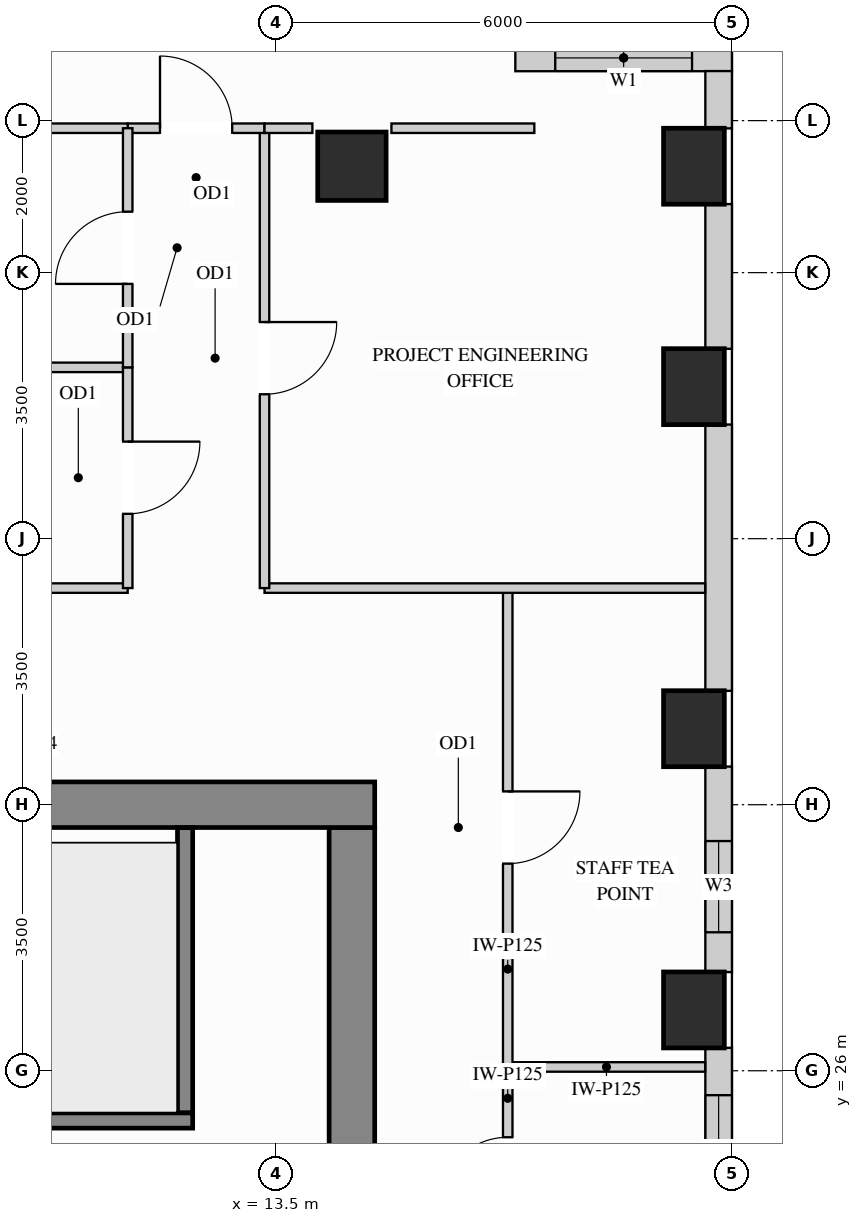
"""IFC4 building model, lengths in metres.
Left out: names, types, materials, properties, quantities, classifications, styles, units other than length and angle.
Written with IfcOpenShell. Run it as: python <this file> out.ifc"""

import sys

from ifc_helpers import new_model, si_unit, direction, frame, frame_2d, origin, origin_2d, place, context, subcontext, project, spatial, rectangle, extrude, source, transform, mapped, element, fill, save


model = new_model("IFC4")
c1 = context("Model", 3, precision=1e-05, world=origin(), true_north=direction((0.0, 1.0)))
c2 = subcontext(c1, "Body", "Model", "MODEL_VIEW")
j1 = project(units=[si_unit("LENGTHUNIT", "METRE"), si_unit("PLANEANGLEUNIT", "RADIAN")], contexts=[c1])
p1 = place(None, origin())
s1 = spatial("IfcSite", under=j1, at=p1, CompositionType="ELEMENT")
p2 = place(p1, origin())
s2 = spatial("IfcBuilding", under=s1, at=p2, CompositionType="ELEMENT")
p3 = place(p2, frame((0.0, 0.0, 197.1)))
s3 = spatial("IfcBuildingStorey", under=s2, at=p3, CompositionType="ELEMENT", Elevation=197.1)
m1 = source(origin(), c2, "Body", "SweptSolid", [
    extrude(rectangle(XDim=0.9, YDim=0.9, at=origin_2d()), origin(), (0.0, 0.0, 1.0), 3.4),
])
p4 = place(p3, frame((14.5, 37.9, 0.0), z_axis=(0.0, 0.0, 1.0), x_axis=(1.0, 0.0, 0.0)))
e1 = element("IfcColumn", 1, at=p4, inside=s3, PredefinedType="COLUMN", context=c2, shape_type="MappedRepresentation", body=[
    mapped(m1, transform((0.0, 0.0, 0.0), x_axis=(1.0, 0.0, 0.0), y_axis=(0.0, 1.0, 0.0), z_axis=(0.0, 0.0, 1.0))),
])
m2 = source(origin(), c2, "Body", "SweptSolid", [
    extrude(rectangle(XDim=0.8, YDim=1.0, at=origin_2d()), origin(), (0.0, 0.0, 1.0), 3.4),
])
for number, where, z_axis, x_axis in (
    (2, (19.0, 26.8, 0.0), (0.0, 0.0, 1.0), (1.0, 0.0, 0.0)),
    (3, (19.0, 30.5, 0.0), (0.0, 0.0, 1.0), (1.0, 0.0, 0.0)),
    (4, (19.0, 35.0, 0.0), (0.0, 0.0, 1.0), (1.0, 0.0, 0.0)),
    (5, (19.0, 37.9, 0.0), (0.0, 0.0, 1.0), (1.0, 0.0, 0.0)),
):
    element("IfcColumn", number, at=place(p3, frame(where, z_axis=z_axis, x_axis=x_axis)), inside=s3, PredefinedType="COLUMN", context=c2, shape_type="MappedRepresentation", body=[
        mapped(m2, transform((0.0, 0.0, 0.0), x_axis=(1.0, 0.0, 0.0), y_axis=(0.0, 1.0, 0.0), z_axis=(0.0, 0.0, 1.0))),
    ])
m3 = source(origin(), c2, "Body", "SweptSolid", [
    extrude(rectangle(XDim=8.32, YDim=0.6, at=frame_2d((4.16, 0.0))), origin(), (0.0, 0.0, 1.0), 3.4),
])
p5 = place(p3, frame((14.5, 20.88, 0.0), z_axis=(0.0, 0.0, 1.0), x_axis=(0.0, 1.0, 0.0)))
e6 = element("IfcWall", 6, at=p5, inside=s3, PredefinedType="SHEAR", context=c2, shape_type="MappedRepresentation", body=[
    mapped(m3, transform((0.0, 0.0, 0.0), x_axis=(1.0, 0.0, 0.0), y_axis=(0.0, 1.0, 0.0), z_axis=(0.0, 0.0, 1.0))),
])
m4 = source(origin(), c2, "Body", "SweptSolid", [
    extrude(rectangle(XDim=10.6, YDim=0.6, at=frame_2d((5.3, 0.0))), origin(), (0.0, 0.0, 1.0), 3.4),
])
p6 = place(p3, frame((4.2, 29.5, 0.0), z_axis=(0.0, 0.0, 1.0), x_axis=(1.0, 0.0, 0.0)))
e7 = element("IfcWall", 7, at=p6, inside=s3, PredefinedType="SHEAR", context=c2, shape_type="MappedRepresentation", body=[
    mapped(m4, transform((0.0, 0.0, 0.0), x_axis=(1.0, 0.0, 0.0), y_axis=(0.0, 1.0, 0.0), z_axis=(0.0, 0.0, 1.0))),
])
p7 = place(p3, frame((19.5, 39.325, 0.0), z_axis=(0.0, 0.0, 1.0), x_axis=(-1.0, 0.0, 0.0)))
e8 = element("IfcWall", 8, at=p7, inside=s3, PredefinedType="SOLIDWALL", context=c2, shape_type="SweptSolid", body=[
    extrude(rectangle(XDim=2.85, YDim=0.35, at=frame_2d((1.425, 0.0))), origin(), (0.0, 0.0, 1.0), 3.385),
])
p8 = place(p7, frame((0.525, 0.0, 0.78)))
e9 = element("IfcOpeningElement", 9, at=p8, cuts=e8, PredefinedType="OPENING", context=c2, shape_type="SweptSolid", body=[
    extrude(rectangle(XDim=1.8, YDim=2.1, at=frame_2d((0.9, 1.05))), frame((0.0, 0.185, 0.0), z_axis=(0.0, -1.0, 0.0), x_axis=(1.0, 0.0, 0.0)), (0.0, 0.0, 1.0), 0.37),
])
p9 = place(p3, frame((19.325, 22.998, 0.0), z_axis=(0.0, 0.0, 1.0), x_axis=(0.0, 1.0, 0.0)))
e10 = element("IfcWall", 10, at=p9, inside=s3, PredefinedType="SOLIDWALL", context=c2, shape_type="SweptSolid", body=[
    extrude(rectangle(XDim=3.304, YDim=0.35, at=frame_2d((1.652, 0.0))), origin(), (0.0, 0.0, 1.0), 2.612),
])
p10 = place(p9, frame((1.18, 0.0, 0.78)))
e11 = element("IfcOpeningElement", 11, at=p10, cuts=e10, PredefinedType="OPENING", context=c2, shape_type="SweptSolid", body=[
    extrude(rectangle(XDim=1.5, YDim=1.652, at=frame_2d((0.75, 0.826))), frame((0.0, 0.185, 0.0), z_axis=(0.0, -1.0, 0.0), x_axis=(1.0, 0.0, 0.0)), (0.0, 0.0, 1.0), 0.37),
])
p11 = place(p3, frame((19.325, 27.298, 0.0), z_axis=(0.0, 0.0, 1.0), x_axis=(0.0, 1.0, 0.0)))
e12 = element("IfcWall", 12, at=p11, inside=s3, PredefinedType="SOLIDWALL", context=c2, shape_type="SweptSolid", body=[
    extrude(rectangle(XDim=2.704, YDim=0.35, at=frame_2d((1.352, 0.0))), origin(), (0.0, 0.0, 1.0), 2.612),
])
p12 = place(p11, frame((0.524, 0.0, 0.78)))
e13 = element("IfcOpeningElement", 13, at=p12, cuts=e12, PredefinedType="OPENING", context=c2, shape_type="SweptSolid", body=[
    extrude(rectangle(XDim=1.2, YDim=1.652, at=frame_2d((0.6, 0.826))), frame((0.0, 0.185, 0.0), z_axis=(0.0, -1.0, 0.0), x_axis=(1.0, 0.0, 0.0)), (0.0, 0.0, 1.0), 0.37),
])
m5 = source(origin(), c2, "Body", "SweptSolid", [
    extrude(rectangle(XDim=3.504, YDim=0.35, at=frame_2d((1.752, 0.0))), origin(), (0.0, 0.0, 1.0), 2.612),
])
p13 = place(p3, frame((19.325, 30.998, 0.0), z_axis=(0.0, 0.0, 1.0), x_axis=(0.0, 1.0, 0.0)))
e14 = element("IfcWall", 14, at=p13, inside=s3, PredefinedType="SOLIDWALL", context=c2, shape_type="MappedRepresentation", body=[
    mapped(m5, transform((0.0, 0.0, 0.0), x_axis=(1.0, 0.0, 0.0), y_axis=(0.0, 1.0, 0.0), z_axis=(0.0, 0.0, 1.0))),
])
m6 = source(origin(), c2, "Body", "SweptSolid", [
    extrude(rectangle(XDim=1.904, YDim=0.35, at=frame_2d((0.952, 0.0))), origin(), (0.0, 0.0, 1.0), 2.612),
])
p14 = place(p3, frame((19.325, 35.498, 0.0), z_axis=(0.0, 0.0, 1.0), x_axis=(0.0, 1.0, 0.0)))
e15 = element("IfcWall", 15, at=p14, inside=s3, PredefinedType="SOLIDWALL", context=c2, shape_type="MappedRepresentation", body=[
    mapped(m6, transform((0.0, 0.0, 0.0), x_axis=(1.0, 0.0, 0.0), y_axis=(0.0, 1.0, 0.0), z_axis=(0.0, 0.0, 1.0))),
])
m7 = source(origin(), c2, "Body", "SweptSolid", [
    extrude(rectangle(XDim=0.754, YDim=0.35, at=frame_2d((0.377, 0.0))), origin(), (0.0, 0.0, 1.0), 3.385),
])
p15 = place(p3, frame((19.325, 38.398, 0.0), z_axis=(0.0, 0.0, 1.0), x_axis=(0.0, 1.0, 0.0)))
e16 = element("IfcWall", 16, at=p15, inside=s3, PredefinedType="SOLIDWALL", context=c2, shape_type="MappedRepresentation", body=[
    mapped(m7, transform((0.0, 0.0, 0.0), x_axis=(1.0, 0.0, 0.0), y_axis=(0.0, 1.0, 0.0), z_axis=(0.0, 0.0, 1.0))),
])
m8 = source(origin(), c2, "Body", "SweptSolid", [
    extrude(rectangle(XDim=2.598, YDim=0.125, at=frame_2d((1.299, 0.0))), origin(), (0.0, 0.0, 1.0), 3.385),
])
p16 = place(p3, frame((16.55, 26.05, 0.0), z_axis=(0.0, 0.0, 1.0), x_axis=(1.0, 0.0, 0.0)))
e17 = element("IfcWall", 17, at=p16, inside=s3, PredefinedType="PARTITIONING", context=c2, shape_type="MappedRepresentation", body=[
    mapped(m8, transform((0.0, 0.0, 0.0), x_axis=(1.0, 0.0, 0.0), y_axis=(0.0, 1.0, 0.0), z_axis=(0.0, 0.0, 1.0))),
])
p17 = place(p3, frame((16.55, 26.05, 0.0), z_axis=(0.0, 0.0, 1.0), x_axis=(0.0, 1.0, 0.0)))
e18 = element("IfcWall", 18, at=p17, inside=s3, PredefinedType="PARTITIONING", context=c2, shape_type="SweptSolid", body=[
    extrude(rectangle(XDim=6.3, YDim=0.125, at=frame_2d((3.15, 0.0))), origin(), (0.0, 0.0, 1.0), 3.385),
])
p18 = place(p17, frame((2.675, 0.0, 0.0)))
e19 = element("IfcOpeningElement", 19, at=p18, cuts=e18, PredefinedType="OPENING", context=c2, shape_type="SweptSolid", body=[
    extrude(rectangle(XDim=0.95, YDim=2.15, at=frame_2d((0.475, 1.075))), frame((0.0, 0.073, 0.0), z_axis=(0.0, -1.0, 0.0), x_axis=(1.0, 0.0, 0.0)), (0.0, 0.0, 1.0), 0.145),
])
p19 = place(p3, frame((16.55, 23.35, 0.0), z_axis=(0.0, 0.0, 1.0), x_axis=(0.0, 1.0, 0.0)))
e20 = element("IfcWall", 20, at=p19, inside=s3, PredefinedType="PARTITIONING", context=c2, shape_type="SweptSolid", body=[
    extrude(rectangle(XDim=2.7, YDim=0.125, at=frame_2d((1.35, 0.0))), origin(), (0.0, 0.0, 1.0), 3.385),
])
p20 = place(p19, frame((0.875, 0.0, 0.0)))
e21 = element("IfcOpeningElement", 21, at=p20, cuts=e20, PredefinedType="OPENING", context=c2, shape_type="SweptSolid", body=[
    extrude(rectangle(XDim=0.9, YDim=2.15, at=frame_2d((0.45, 1.075))), frame((0.0, 0.073, 0.0), z_axis=(0.0, -1.0, 0.0), x_axis=(1.0, 0.0, 0.0)), (0.0, 0.0, 1.0), 0.145),
])
m9 = source(origin(), c2, "Body", "SweptSolid", [
    extrude(rectangle(XDim=5.798, YDim=0.125, at=frame_2d((2.899, 0.0))), origin(), (0.0, 0.0, 1.0), 3.385),
])
p21 = place(p3, frame((13.35, 32.35, 0.0), z_axis=(0.0, 0.0, 1.0), x_axis=(1.0, 0.0, 0.0)))
e22 = element("IfcWall", 22, at=p21, inside=s3, PredefinedType="PARTITIONING", context=c2, shape_type="MappedRepresentation", body=[
    mapped(m9, transform((0.0, 0.0, 0.0), x_axis=(1.0, 0.0, 0.0), y_axis=(0.0, 1.0, 0.0), z_axis=(0.0, 0.0, 1.0))),
])
m10 = source(origin(), c2, "Body", "SweptSolid", [
    extrude(rectangle(XDim=11.198, YDim=0.125, at=frame_2d((5.599, 0.0))), origin(), (0.0, 0.0, 1.0), 3.385),
])
p22 = place(p3, frame((0.352, 32.35, 0.0), z_axis=(0.0, 0.0, 1.0), x_axis=(1.0, 0.0, 0.0)))
e23 = element("IfcWall", 23, at=p22, inside=s3, PredefinedType="PARTITIONING", context=c2, shape_type="MappedRepresentation", body=[
    mapped(m10, transform((0.0, 0.0, 0.0), x_axis=(1.0, 0.0, 0.0), y_axis=(0.0, 1.0, 0.0), z_axis=(0.0, 0.0, 1.0))),
])
m11 = source(origin(), c2, "Body", "SweptSolid", [
    extrude(rectangle(XDim=10.43, YDim=0.125, at=frame_2d((5.215, 0.0))), origin(), (0.0, 0.0, 1.0), 2.448),
])
p23 = place(p3, frame((1.12, 35.254, 0.0), z_axis=(0.0, 0.0, 1.0), x_axis=(1.0, 0.0, 0.0)))
e24 = element("IfcWall", 24, at=p23, inside=s3, PredefinedType="PARTITIONING", context=c2, shape_type="MappedRepresentation", body=[
    mapped(m11, transform((0.0, 0.0, 0.0), x_axis=(1.0, 0.0, 0.0), y_axis=(0.0, 1.0, 0.0), z_axis=(0.0, 0.0, 1.0))),
])
p24 = place(p3, frame((13.35, 32.35, 0.0), z_axis=(0.0, 0.0, 1.0), x_axis=(0.0, 1.0, 0.0)))
e25 = element("IfcWall", 25, at=p24, inside=s3, PredefinedType="PARTITIONING", context=c2, shape_type="SweptSolid", body=[
    extrude(rectangle(XDim=6.05, YDim=0.125, at=frame_2d((3.025, 0.0))), origin(), (0.0, 0.0, 1.0), 3.385),
])
p25 = place(p24, frame((2.55, 0.0, 0.0)))
e26 = element("IfcOpeningElement", 26, at=p25, cuts=e25, PredefinedType="OPENING", context=c2, shape_type="SweptSolid", body=[
    extrude(rectangle(XDim=0.95, YDim=2.15, at=frame_2d((0.475, 1.075))), frame((0.0, 0.073, 0.0), z_axis=(0.0, -1.0, 0.0), x_axis=(1.0, 0.0, 0.0)), (0.0, 0.0, 1.0), 0.145),
])
p26 = place(p3, frame((11.55, 38.4, 0.0), z_axis=(0.0, 0.0, 1.0), x_axis=(1.0, 0.0, 0.0)))
e27 = element("IfcWall", 27, at=p26, inside=s3, PredefinedType="PARTITIONING", context=c2, shape_type="SweptSolid", body=[
    extrude(rectangle(XDim=1.8, YDim=0.125, at=frame_2d((0.9, 0.0))), origin(), (0.0, 0.0, 1.0), 3.385),
])
p27 = place(p26, frame((0.425, 0.0, 0.0)))
e28 = element("IfcOpeningElement", 28, at=p27, cuts=e27, PredefinedType="OPENING", context=c2, shape_type="SweptSolid", body=[
    extrude(rectangle(XDim=0.95, YDim=2.15, at=frame_2d((0.475, 1.075))), frame((0.0, 0.073, 0.0), z_axis=(0.0, -1.0, 0.0), x_axis=(1.0, 0.0, 0.0)), (0.0, 0.0, 1.0), 0.145),
])
m12 = source(origin(), c2, "Body", "SweptSolid", [
    extrude(rectangle(XDim=0.63, YDim=0.125, at=frame_2d((0.315, 0.0))), origin(), (0.0, 0.0, 1.0), 3.385),
])
p28 = place(p3, frame((13.35, 38.4, 0.0), z_axis=(0.0, 0.0, 1.0), x_axis=(1.0, 0.0, 0.0)))
e29 = element("IfcWall", 29, at=p28, inside=s3, PredefinedType="PARTITIONING", context=c2, shape_type="MappedRepresentation", body=[
    mapped(m12, transform((0.0, 0.0, 0.0), x_axis=(1.0, 0.0, 0.0), y_axis=(0.0, 1.0, 0.0), z_axis=(0.0, 0.0, 1.0))),
])
m13 = source(origin(), c2, "Body", "SweptSolid", [
    extrude(rectangle(XDim=1.88, YDim=0.125, at=frame_2d((0.94, 0.0))), origin(), (0.0, 0.0, 1.0), 3.385),
])
p29 = place(p3, frame((15.02, 38.4, 0.0), z_axis=(0.0, 0.0, 1.0), x_axis=(1.0, 0.0, 0.0)))
e30 = element("IfcWall", 30, at=p29, inside=s3, PredefinedType="PARTITIONING", context=c2, shape_type="MappedRepresentation", body=[
    mapped(m13, transform((0.0, 0.0, 0.0), x_axis=(1.0, 0.0, 0.0), y_axis=(0.0, 1.0, 0.0), z_axis=(0.0, 0.0, 1.0))),
])
m14 = source(origin(), c2, "Body", "SweptSolid", [
    extrude(rectangle(XDim=2.03, YDim=0.125, at=frame_2d((1.015, 0.0))), origin(), (0.0, 0.0, 1.0), 3.385),
])
p30 = place(p3, frame((9.52, 38.4, 0.0), z_axis=(0.0, 0.0, 1.0), x_axis=(1.0, 0.0, 0.0)))
e31 = element("IfcWall", 31, at=p30, inside=s3, PredefinedType="PARTITIONING", context=c2, shape_type="MappedRepresentation", body=[
    mapped(m14, transform((0.0, 0.0, 0.0), x_axis=(1.0, 0.0, 0.0), y_axis=(0.0, 1.0, 0.0), z_axis=(0.0, 0.0, 1.0))),
])
p31 = place(p3, frame((11.55, 32.35, 0.0), z_axis=(0.0, 0.0, 1.0), x_axis=(0.0, 1.0, 0.0)))
e32 = element("IfcWall", 32, at=p31, inside=s3, PredefinedType="PARTITIONING", context=c2, shape_type="SweptSolid", body=[
    extrude(rectangle(XDim=2.904, YDim=0.125, at=frame_2d((1.452, 0.0))), origin(), (0.0, 0.0, 1.0), 3.385),
])
p32 = place(p31, frame((0.977, 0.0, 0.0)))
e33 = element("IfcOpeningElement", 33, at=p32, cuts=e32, PredefinedType="OPENING", context=c2, shape_type="SweptSolid", body=[
    extrude(rectangle(XDim=0.95, YDim=2.15, at=frame_2d((0.475, 1.075))), frame((0.0, 0.073, 0.0), z_axis=(0.0, -1.0, 0.0), x_axis=(1.0, 0.0, 0.0)), (0.0, 0.0, 1.0), 0.145),
])
p33 = place(p3, frame((11.55, 35.254, 0.0), z_axis=(0.0, 0.0, 1.0), x_axis=(0.0, 1.0, 0.0)))
e34 = element("IfcWall", 34, at=p33, inside=s3, PredefinedType="PARTITIONING", context=c2, shape_type="SweptSolid", body=[
    extrude(rectangle(XDim=3.146, YDim=0.125, at=frame_2d((1.573, 0.0))), origin(), (0.0, 0.0, 1.0), 3.385),
])
p34 = place(p33, frame((1.098, 0.0, 0.0)))
e35 = element("IfcOpeningElement", 35, at=p34, cuts=e34, PredefinedType="OPENING", context=c2, shape_type="SweptSolid", body=[
    extrude(rectangle(XDim=0.95, YDim=2.15, at=frame_2d((0.475, 1.075))), frame((0.0, 0.073, 0.0), z_axis=(0.0, -1.0, 0.0), x_axis=(1.0, 0.0, 0.0)), (0.0, 0.0, 1.0), 0.145),
])
m15 = source(origin(), c2, "Body", "SweptSolid", [
    extrude(rectangle(XDim=3.753, YDim=0.2, at=frame_2d((1.876, 0.0))), origin(), (0.0, 0.0, 1.0), 3.4),
])
p35 = place(p3, frame((12.305, 25.445, 0.0), z_axis=(0.0, 0.0, 1.0), x_axis=(0.0, 1.0, 0.0)))
e36 = element("IfcWall", 36, at=p35, inside=s3, PredefinedType="SHEAR", context=c2, shape_type="MappedRepresentation", body=[
    mapped(m15, transform((0.0, 0.0, 0.0), x_axis=(1.0, 0.0, 0.0), y_axis=(0.0, 1.0, 0.0), z_axis=(0.0, 0.0, 1.0))),
])
p36 = place(p3, frame((4.802, 25.345, 0.0), z_axis=(0.0, 0.0, 1.0), x_axis=(1.0, 0.0, 0.0)))
e37 = element("IfcWall", 37, at=p36, inside=s3, PredefinedType="SHEAR", context=c2, shape_type="SweptSolid", body=[
    extrude(rectangle(XDim=7.603, YDim=0.2, at=frame_2d((3.802, 0.0))), origin(), (0.0, 0.0, 1.0), 3.4),
])
p37 = place(p36, frame((0.4, 0.0, 0.0)))
e38 = element("IfcOpeningElement", 38, at=p37, cuts=e37, PredefinedType="OPENING", context=c2, shape_type="SweptSolid", body=[
    extrude(rectangle(XDim=1.1, YDim=2.15, at=frame_2d((0.55, 1.075))), frame((0.0, 0.11, 0.0), z_axis=(0.0, -1.0, 0.0), x_axis=(1.0, 0.0, 0.0)), (0.0, 0.0, 1.0), 0.22),
])
m16 = source(origin(), c2, "Body", "SweptSolid", [
    extrude(rectangle(XDim=0.95, YDim=2.15, at=frame_2d((0.475, 1.075))), frame((0.0, 0.025, 0.0), z_axis=(0.0, -1.0, 0.0), x_axis=(1.0, 0.0, 0.0)), (0.0, 0.0, 1.0), 0.05),
])
p38 = place(p18, origin())
e39 = element("IfcDoor", 39, at=p38, inside=s3, OperationType="SINGLE_SWING_RIGHT", PredefinedType="DOOR", context=c2, shape_type="MappedRepresentation", body=[
    mapped(m16, transform((0.0, 0.0, 0.0), x_axis=(1.0, 0.0, 0.0), y_axis=(0.0, 1.0, 0.0), z_axis=(0.0, 0.0, 1.0))),
])
fill(e19, e39)
p39 = place(p25, origin())
e40 = element("IfcDoor", 40, at=p39, inside=s3, OperationType="SINGLE_SWING_RIGHT", PredefinedType="DOOR", context=c2, shape_type="MappedRepresentation", body=[
    mapped(m16, transform((0.0, 0.0, 0.0), x_axis=(1.0, 0.0, 0.0), y_axis=(0.0, 1.0, 0.0), z_axis=(0.0, 0.0, 1.0))),
])
fill(e26, e40)
p40 = place(p27, origin())
e41 = element("IfcDoor", 41, at=p40, inside=s3, OperationType="SINGLE_SWING_LEFT", PredefinedType="DOOR", context=c2, shape_type="MappedRepresentation", body=[
    mapped(m16, transform((0.0, 0.0, 0.0), x_axis=(1.0, 0.0, 0.0), y_axis=(0.0, 1.0, 0.0), z_axis=(0.0, 0.0, 1.0))),
])
fill(e28, e41)
p41 = place(p32, origin())
e42 = element("IfcDoor", 42, at=p41, inside=s3, OperationType="SINGLE_SWING_RIGHT", PredefinedType="DOOR", context=c2, shape_type="MappedRepresentation", body=[
    mapped(m16, transform((0.0, 0.0, 0.0), x_axis=(1.0, 0.0, 0.0), y_axis=(0.0, 1.0, 0.0), z_axis=(0.0, 0.0, 1.0))),
])
fill(e33, e42)
p42 = place(p34, origin())
e43 = element("IfcDoor", 43, at=p42, inside=s3, OperationType="SINGLE_SWING_LEFT", PredefinedType="DOOR", context=c2, shape_type="MappedRepresentation", body=[
    mapped(m16, transform((0.0, 0.0, 0.0), x_axis=(1.0, 0.0, 0.0), y_axis=(0.0, 1.0, 0.0), z_axis=(0.0, 0.0, 1.0))),
])
fill(e35, e43)
m17 = source(origin(), c2, "Body", "SweptSolid", [
    extrude(rectangle(XDim=0.9, YDim=2.15, at=frame_2d((0.45, 1.075))), frame((0.0, 0.025, 0.0), z_axis=(0.0, -1.0, 0.0), x_axis=(1.0, 0.0, 0.0)), (0.0, 0.0, 1.0), 0.05),
])
p43 = place(p20, origin())
e44 = element("IfcDoor", 44, at=p43, inside=s3, OperationType="SINGLE_SWING_LEFT", PredefinedType="DOOR", context=c2, shape_type="MappedRepresentation", body=[
    mapped(m17, transform((0.0, 0.0, 0.0), x_axis=(1.0, 0.0, 0.0), y_axis=(0.0, 1.0, 0.0), z_axis=(0.0, 0.0, 1.0))),
])
fill(e21, e44)
m18 = source(origin(), c2, "Body", "SweptSolid", [
    extrude(rectangle(XDim=1.8, YDim=2.1, at=frame_2d((0.9, 1.05))), frame((0.0, 0.03, 0.0), z_axis=(0.0, -1.0, 0.0), x_axis=(1.0, 0.0, 0.0)), (0.0, 0.0, 1.0), 0.06),
])
p44 = place(p8, origin())
e45 = element("IfcWindow", 45, at=p44, inside=s3, PartitioningType="SINGLE_PANEL", PredefinedType="WINDOW", context=c2, shape_type="MappedRepresentation", body=[
    mapped(m18, transform((0.0, 0.0, 0.0), x_axis=(1.0, 0.0, 0.0), y_axis=(0.0, 1.0, 0.0), z_axis=(0.0, 0.0, 1.0))),
])
fill(e9, e45)
m19 = source(origin(), c2, "Body", "SweptSolid", [
    extrude(rectangle(XDim=1.2, YDim=1.652, at=frame_2d((0.6, 0.826))), frame((0.0, 0.03, 0.0), z_axis=(0.0, -1.0, 0.0), x_axis=(1.0, 0.0, 0.0)), (0.0, 0.0, 1.0), 0.06),
])
p45 = place(p12, origin())
e46 = element("IfcWindow", 46, at=p45, inside=s3, PartitioningType="SINGLE_PANEL", PredefinedType="WINDOW", context=c2, shape_type="MappedRepresentation", body=[
    mapped(m19, transform((0.0, 0.0, 0.0), x_axis=(1.0, 0.0, 0.0), y_axis=(0.0, 1.0, 0.0), z_axis=(0.0, 0.0, 1.0))),
])
fill(e13, e46)
m20 = source(origin(), c2, "Body", "SweptSolid", [
    extrude(rectangle(XDim=1.5, YDim=1.652, at=frame_2d((0.75, 0.826))), frame((0.0, 0.03, 0.0), z_axis=(0.0, -1.0, 0.0), x_axis=(1.0, 0.0, 0.0)), (0.0, 0.0, 1.0), 0.06),
])
p46 = place(p10, origin())
e47 = element("IfcWindow", 47, at=p46, inside=s3, PartitioningType="SINGLE_PANEL", PredefinedType="WINDOW", context=c2, shape_type="MappedRepresentation", body=[
    mapped(m20, transform((0.0, 0.0, 0.0), x_axis=(1.0, 0.0, 0.0), y_axis=(0.0, 1.0, 0.0), z_axis=(0.0, 0.0, 1.0))),
])
fill(e11, e47)
save(model, sys.argv[1])
